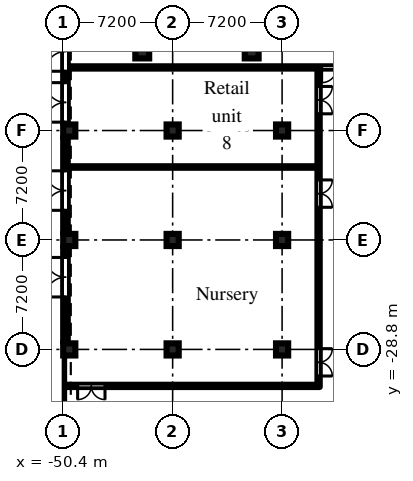
"""IFC4 building model, lengths in metres.
Left out: names, types, materials, properties, quantities, classifications, styles, units other than length and angle.
Written with IfcOpenShell. Run it as: python <this file> out.ifc"""

import sys

from ifc_helpers import new_model, si_unit, direction, frame, frame_2d, origin, origin_2d, place, context, subcontext, project, spatial, rectangle, hollow_circle, extrude, element, fill, save


model = new_model("IFC4")
c1 = context("Model", 3, precision=1e-05, world=origin(), true_north=direction((0.0, 1.0)))
c2 = subcontext(c1, "Body", "Model", "MODEL_VIEW")
j1 = project(units=[si_unit("LENGTHUNIT", "METRE"), si_unit("PLANEANGLEUNIT", "RADIAN")], contexts=[c1])
p1 = place(None, origin())
s1 = spatial("IfcSite", under=j1, at=p1, CompositionType="ELEMENT")
p2 = place(p1, origin())
s2 = spatial("IfcBuilding", under=s1, at=p2, CompositionType="ELEMENT")
p3 = place(p2, origin())
s3 = spatial("IfcBuildingStorey", under=s2, at=p3, CompositionType="ELEMENT", Elevation=0.0)
for number, where, z_axis, x_axis in (
    (1, (-50.0, -28.8, 0.0), (0.0, 0.0, 1.0), (1.0, 0.0, 0.0)),
    (2, (-50.0, -21.6, 0.0), (0.0, 0.0, 1.0), (1.0, 0.0, 0.0)),
    (3, (-50.0, -14.4, 0.0), (0.0, 0.0, 1.0), (1.0, 0.0, 0.0)),
    (4, (-43.2, -28.8, 0.0), (0.0, 0.0, 1.0), (1.0, 0.0, 0.0)),
    (5, (-43.2, -21.6, 0.0), (0.0, 0.0, 1.0), (1.0, 0.0, 0.0)),
    (6, (-43.2, -14.4, 0.0), (0.0, 0.0, 1.0), (1.0, 0.0, 0.0)),
    (7, (-36.0, -28.8, 0.0), (0.0, 0.0, 1.0), (1.0, 0.0, 0.0)),
    (8, (-36.0, -21.6, 0.0), (0.0, 0.0, 1.0), (1.0, 0.0, 0.0)),
    (9, (-36.0, -14.4, 0.0), (0.0, 0.0, 1.0), (1.0, 0.0, 0.0)),
):
    element("IfcColumn", number, at=place(p3, frame(where, z_axis=z_axis, x_axis=x_axis)), inside=s3, PredefinedType="COLUMN", context=c2, shape_type="SweptSolid", body=[
        extrude(rectangle(XDim=0.8, YDim=0.8, at=origin_2d()), origin(), (0.0, 0.0, 1.0), 6.6),
    ])
for number, where, z_axis, x_axis in (
    (10, (-45.2, -9.2, 0.0), (0.0, 0.0, 1.0), (1.0, 0.0, 0.0)),
    (11, (-38.0, -9.2, 0.0), (0.0, 0.0, 1.0), (1.0, 0.0, 0.0)),
):
    element("IfcColumn", number, at=place(p3, frame(where, z_axis=z_axis, x_axis=x_axis)), inside=s3, PredefinedType="COLUMN", context=c2, shape_type="SweptSolid", body=[
        extrude(hollow_circle(Radius=0.457, WallThickness=0.05, at=origin_2d()), origin(), (0.0, 0.0, 1.0), 7.5),
    ])
p4 = place(p3, frame((-50.25, -7.6, 0.0), z_axis=(0.0, 0.0, 1.0), x_axis=(0.0, -1.0, 0.0)))
e12 = element("IfcWall", 12, at=p4, inside=s3, PredefinedType="SOLIDWALL", context=c2, shape_type="SweptSolid", body=[
    extrude(rectangle(XDim=6.4, YDim=0.3, at=frame_2d((3.2, 0.0))), origin(), (0.0, 0.0, 1.0), 6.6),
])
p5 = place(p4, frame((0.3, 0.0, 0.0)))
e13 = element("IfcOpeningElement", 13, at=p5, cuts=e12, PredefinedType="OPENING", context=c2, shape_type="SweptSolid", body=[
    extrude(rectangle(XDim=2.6, YDim=2.4, at=frame_2d((1.3, 1.2))), frame((0.0, 0.16, 0.0), z_axis=(0.0, -1.0, 0.0), x_axis=(1.0, 0.0, 0.0)), (0.0, 0.0, 1.0), 0.32),
])
p6 = place(p4, frame((3.65, 0.0, 0.0)))
e14 = element("IfcOpeningElement", 14, at=p6, cuts=e12, PredefinedType="OPENING", context=c2, shape_type="SweptSolid", body=[
    extrude(rectangle(XDim=2.6, YDim=2.4, at=frame_2d((1.3, 1.2))), frame((0.0, 0.16, 0.0), z_axis=(0.0, -1.0, 0.0), x_axis=(1.0, 0.0, 0.0)), (0.0, 0.0, 1.0), 0.32),
])
p7 = place(p3, frame((-50.25, -14.8, 0.0), z_axis=(0.0, 0.0, 1.0), x_axis=(0.0, -1.0, 0.0)))
e15 = element("IfcWall", 15, at=p7, inside=s3, PredefinedType="SOLIDWALL", context=c2, shape_type="SweptSolid", body=[
    extrude(rectangle(XDim=6.4, YDim=0.3, at=frame_2d((3.2, 0.0))), origin(), (0.0, 0.0, 1.0), 6.6),
])
p8 = place(p7, frame((2.25, 0.0, 0.0)))
e16 = element("IfcOpeningElement", 16, at=p8, cuts=e15, PredefinedType="OPENING", context=c2, shape_type="SweptSolid", body=[
    extrude(rectangle(XDim=2.6, YDim=2.4, at=frame_2d((1.3, 1.2))), frame((0.0, 0.16, 0.0), z_axis=(0.0, -1.0, 0.0), x_axis=(1.0, 0.0, 0.0)), (0.0, 0.0, 1.0), 0.32),
])
p9 = place(p3, frame((-50.25, -22.0, 0.0), z_axis=(0.0, 0.0, 1.0), x_axis=(0.0, -1.0, 0.0)))
e17 = element("IfcWall", 17, at=p9, inside=s3, PredefinedType="SOLIDWALL", context=c2, shape_type="SweptSolid", body=[
    extrude(rectangle(XDim=6.4, YDim=0.3, at=frame_2d((3.2, 0.0))), origin(), (0.0, 0.0, 1.0), 6.6),
])
p10 = place(p9, frame((0.75, 0.0, 0.0)))
e18 = element("IfcOpeningElement", 18, at=p10, cuts=e17, PredefinedType="OPENING", context=c2, shape_type="SweptSolid", body=[
    extrude(rectangle(XDim=2.6, YDim=2.4, at=frame_2d((1.3, 1.2))), frame((0.0, 0.16, 0.0), z_axis=(0.0, -1.0, 0.0), x_axis=(1.0, 0.0, 0.0)), (0.0, 0.0, 1.0), 0.32),
])
p11 = place(p3, frame((-50.22, -31.2, 0.0), z_axis=(0.0, 0.0, 1.0), x_axis=(1.0, 0.0, 0.0)))
e19 = element("IfcWall", 19, at=p11, inside=s3, PredefinedType="PARTITIONING", context=c2, shape_type="SweptSolid", body=[
    extrude(rectangle(XDim=16.545, YDim=0.15, at=frame_2d((8.272, 0.0))), origin(), (0.0, 0.0, 1.0), 6.6),
])
p12 = place(p11, frame((0.77, 0.0, 0.0)))
e20 = element("IfcOpeningElement", 20, at=p12, cuts=e19, PredefinedType="OPENING", context=c2, shape_type="SweptSolid", body=[
    extrude(rectangle(XDim=1.8, YDim=2.1, at=frame_2d((0.9, 1.05))), frame((0.0, 0.085, 0.0), z_axis=(0.0, -1.0, 0.0), x_axis=(1.0, 0.0, 0.0)), (0.0, 0.0, 1.0), 0.17),
])
p13 = place(p3, frame((-50.22, -16.8, 0.0), z_axis=(0.0, 0.0, 1.0), x_axis=(1.0, 0.0, 0.0)))
e21 = element("IfcWall", 21, at=p13, inside=s3, PredefinedType="PARTITIONING", context=c2, shape_type="SweptSolid", body=[
    extrude(rectangle(XDim=16.545, YDim=0.1, at=frame_2d((8.272, 0.0))), origin(), (0.0, 0.0, 1.0), 6.6),
])
p14 = place(p3, frame((-50.22, -10.25, 0.0), z_axis=(0.0, 0.0, 1.0), x_axis=(1.0, 0.0, 0.0)))
e22 = element("IfcWall", 22, at=p14, inside=s3, PredefinedType="PARTITIONING", context=c2, shape_type="SweptSolid", body=[
    extrude(rectangle(XDim=37.695, YDim=0.15, at=frame_2d((18.848, 0.0))), origin(), (0.0, 0.0, 1.0), 6.6),
])
p15 = place(p14, frame((16.82, 0.0, 0.0)))
e23 = element("IfcOpeningElement", 23, at=p15, cuts=e22, PredefinedType="OPENING", context=c2, shape_type="SweptSolid", body=[
    extrude(rectangle(XDim=2.0, YDim=2.1, at=frame_2d((1.0, 1.05))), frame((0.0, 0.085, 0.0), z_axis=(0.0, -1.0, 0.0), x_axis=(1.0, 0.0, 0.0)), (0.0, 0.0, 1.0), 0.17),
])
p16 = place(p14, frame((32.12, 0.0, 0.0)))
e24 = element("IfcOpeningElement", 24, at=p16, cuts=e22, PredefinedType="OPENING", context=c2, shape_type="SweptSolid", body=[
    extrude(rectangle(XDim=1.2, YDim=2.1, at=frame_2d((0.6, 1.05))), frame((0.0, 0.085, 0.0), z_axis=(0.0, -1.0, 0.0), x_axis=(1.0, 0.0, 0.0)), (0.0, 0.0, 1.0), 0.17),
])
p17 = place(p3, frame((-33.6, -31.275, 0.0), z_axis=(0.0, 0.0, 1.0), x_axis=(0.0, 1.0, 0.0)))
e25 = element("IfcWall", 25, at=p17, inside=s3, PredefinedType="PARTITIONING", context=c2, shape_type="SweptSolid", body=[
    extrude(rectangle(XDim=20.95, YDim=0.15, at=frame_2d((10.475, 0.0))), origin(), (0.0, 0.0, 1.0), 6.6),
])
p18 = place(p17, frame((17.975, 0.0, 0.0)))
e26 = element("IfcOpeningElement", 26, at=p18, cuts=e25, PredefinedType="OPENING", context=c2, shape_type="SweptSolid", body=[
    extrude(rectangle(XDim=1.8, YDim=2.1, at=frame_2d((0.9, 1.05))), frame((0.0, 0.085, 0.0), z_axis=(0.0, -1.0, 0.0), x_axis=(1.0, 0.0, 0.0)), (0.0, 0.0, 1.0), 0.17),
])
p19 = place(p17, frame((0.725, 0.0, 0.0)))
e27 = element("IfcOpeningElement", 27, at=p19, cuts=e25, PredefinedType="OPENING", context=c2, shape_type="SweptSolid", body=[
    extrude(rectangle(XDim=1.8, YDim=2.1, at=frame_2d((0.9, 1.05))), frame((0.0, 0.085, 0.0), z_axis=(0.0, -1.0, 0.0), x_axis=(1.0, 0.0, 0.0)), (0.0, 0.0, 1.0), 0.17),
])
p20 = place(p17, frame((11.825, 0.0, 0.0)))
e28 = element("IfcOpeningElement", 28, at=p20, cuts=e25, PredefinedType="OPENING", context=c2, shape_type="SweptSolid", body=[
    extrude(rectangle(XDim=1.8, YDim=2.1, at=frame_2d((0.9, 1.05))), frame((0.0, 0.085, 0.0), z_axis=(0.0, -1.0, 0.0), x_axis=(1.0, 0.0, 0.0)), (0.0, 0.0, 1.0), 0.17),
])
p21 = place(p5, frame((2.6, 0.0, 0.0), z_axis=(0.0, 0.0, 1.0), x_axis=(-1.0, 0.0, 0.0)))
e29 = element("IfcDoor", 29, at=p21, inside=s3, OperationType="DOUBLE_DOOR_DOUBLE_SWING", PredefinedType="DOOR", context=c2, shape_type="SweptSolid", body=[
    extrude(rectangle(XDim=2.6, YDim=2.4, at=frame_2d((1.3, 1.2))), frame((0.0, 0.025, 0.0), z_axis=(0.0, -1.0, 0.0), x_axis=(1.0, 0.0, 0.0)), (0.0, 0.0, 1.0), 0.05),
])
fill(e13, e29)
p22 = place(p6, frame((2.6, 0.0, 0.0), z_axis=(0.0, 0.0, 1.0), x_axis=(-1.0, 0.0, 0.0)))
e30 = element("IfcDoor", 30, at=p22, inside=s3, OperationType="DOUBLE_DOOR_DOUBLE_SWING", PredefinedType="DOOR", context=c2, shape_type="SweptSolid", body=[
    extrude(rectangle(XDim=2.6, YDim=2.4, at=frame_2d((1.3, 1.2))), frame((0.0, 0.025, 0.0), z_axis=(0.0, -1.0, 0.0), x_axis=(1.0, 0.0, 0.0)), (0.0, 0.0, 1.0), 0.05),
])
fill(e14, e30)
p23 = place(p8, frame((2.6, 0.0, 0.0), z_axis=(0.0, 0.0, 1.0), x_axis=(-1.0, 0.0, 0.0)))
e31 = element("IfcDoor", 31, at=p23, inside=s3, OperationType="DOUBLE_DOOR_DOUBLE_SWING", PredefinedType="DOOR", context=c2, shape_type="SweptSolid", body=[
    extrude(rectangle(XDim=2.6, YDim=2.4, at=frame_2d((1.3, 1.2))), frame((0.0, 0.025, 0.0), z_axis=(0.0, -1.0, 0.0), x_axis=(1.0, 0.0, 0.0)), (0.0, 0.0, 1.0), 0.05),
])
fill(e16, e31)
p24 = place(p10, frame((2.6, 0.0, 0.0), z_axis=(0.0, 0.0, 1.0), x_axis=(-1.0, 0.0, 0.0)))
e32 = element("IfcDoor", 32, at=p24, inside=s3, OperationType="DOUBLE_DOOR_DOUBLE_SWING", PredefinedType="DOOR", context=c2, shape_type="SweptSolid", body=[
    extrude(rectangle(XDim=2.6, YDim=2.4, at=frame_2d((1.3, 1.2))), frame((0.0, 0.025, 0.0), z_axis=(0.0, -1.0, 0.0), x_axis=(1.0, 0.0, 0.0)), (0.0, 0.0, 1.0), 0.05),
])
fill(e18, e32)
p25 = place(p15, frame((2.0, 0.0, 0.0), z_axis=(0.0, 0.0, 1.0), x_axis=(-1.0, 0.0, 0.0)))
e33 = element("IfcDoor", 33, at=p25, inside=s3, OperationType="DOUBLE_DOOR_DOUBLE_SWING", PredefinedType="DOOR", context=c2, shape_type="SweptSolid", body=[
    extrude(rectangle(XDim=2.0, YDim=2.1, at=frame_2d((1.0, 1.05))), frame((0.0, 0.025, 0.0), z_axis=(0.0, -1.0, 0.0), x_axis=(1.0, 0.0, 0.0)), (0.0, 0.0, 1.0), 0.05),
])
fill(e23, e33)
p26 = place(p18, frame((1.8, 0.0, 0.0), z_axis=(0.0, 0.0, 1.0), x_axis=(-1.0, 0.0, 0.0)))
e34 = element("IfcDoor", 34, at=p26, inside=s3, OperationType="DOUBLE_DOOR_DOUBLE_SWING", PredefinedType="DOOR", context=c2, shape_type="SweptSolid", body=[
    extrude(rectangle(XDim=1.8, YDim=2.1, at=frame_2d((0.9, 1.05))), frame((0.0, 0.025, 0.0), z_axis=(0.0, -1.0, 0.0), x_axis=(1.0, 0.0, 0.0)), (0.0, 0.0, 1.0), 0.05),
])
fill(e26, e34)
p27 = place(p12, frame((1.8, 0.0, 0.0), z_axis=(0.0, 0.0, 1.0), x_axis=(-1.0, 0.0, 0.0)))
e35 = element("IfcDoor", 35, at=p27, inside=s3, OperationType="DOUBLE_DOOR_DOUBLE_SWING", PredefinedType="DOOR", context=c2, shape_type="SweptSolid", body=[
    extrude(rectangle(XDim=1.8, YDim=2.1, at=frame_2d((0.9, 1.05))), frame((0.0, 0.025, 0.0), z_axis=(0.0, -1.0, 0.0), x_axis=(1.0, 0.0, 0.0)), (0.0, 0.0, 1.0), 0.05),
])
fill(e20, e35)
p28 = place(p19, frame((1.8, 0.0, 0.0), z_axis=(0.0, 0.0, 1.0), x_axis=(-1.0, 0.0, 0.0)))
e36 = element("IfcDoor", 36, at=p28, inside=s3, OperationType="DOUBLE_DOOR_DOUBLE_SWING", PredefinedType="DOOR", context=c2, shape_type="SweptSolid", body=[
    extrude(rectangle(XDim=1.8, YDim=2.1, at=frame_2d((0.9, 1.05))), frame((0.0, 0.025, 0.0), z_axis=(0.0, -1.0, 0.0), x_axis=(1.0, 0.0, 0.0)), (0.0, 0.0, 1.0), 0.05),
])
fill(e27, e36)
p29 = place(p20, frame((1.8, 0.0, 0.0), z_axis=(0.0, 0.0, 1.0), x_axis=(-1.0, 0.0, 0.0)))
e37 = element("IfcDoor", 37, at=p29, inside=s3, OperationType="DOUBLE_DOOR_DOUBLE_SWING", PredefinedType="DOOR", context=c2, shape_type="SweptSolid", body=[
    extrude(rectangle(XDim=1.8, YDim=2.1, at=frame_2d((0.9, 1.05))), frame((0.0, 0.025, 0.0), z_axis=(0.0, -1.0, 0.0), x_axis=(1.0, 0.0, 0.0)), (0.0, 0.0, 1.0), 0.05),
])
fill(e28, e37)
save(model, sys.argv[1])
